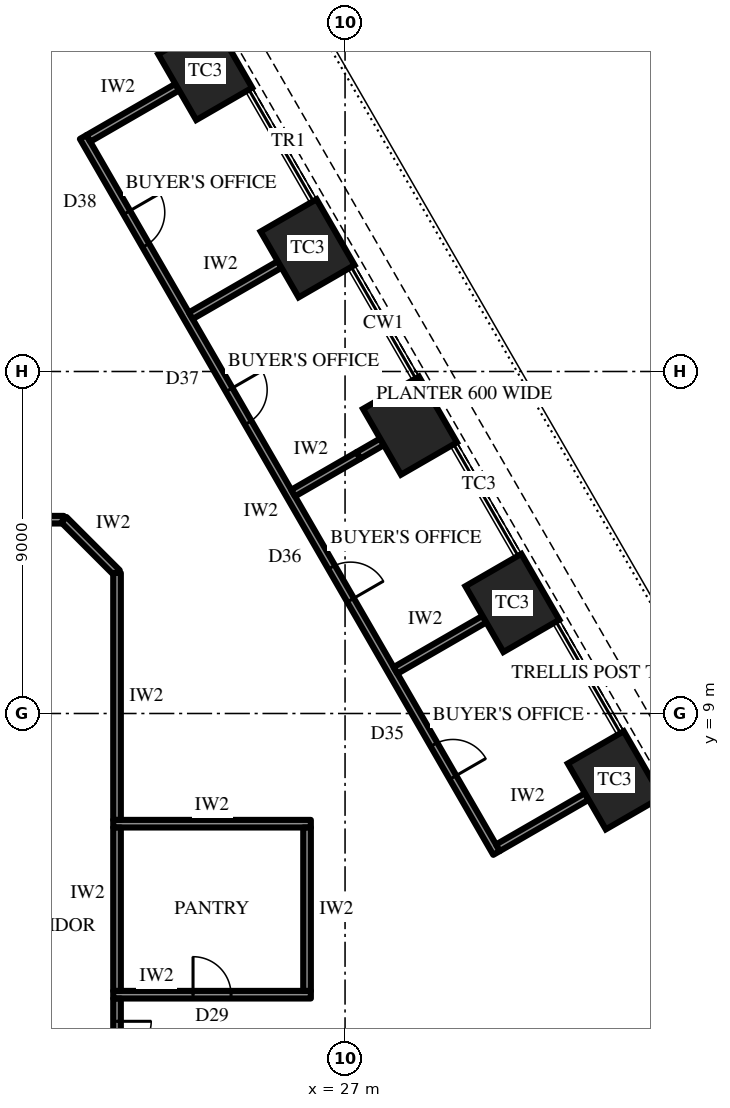
"""IFC4 building model, lengths in metres.
Left out: names, types, materials, properties, quantities, classifications, styles, units other than length and angle.
Written with IfcOpenShell. Run it as: python <this file> out.ifc"""

import sys

from ifc_helpers import new_model, si_unit, direction, frame, frame_2d, origin, origin_2d, place, context, subcontext, project, spatial, rectangle, extrude, element, fill, save


model = new_model("IFC4")
c1 = context("Model", 3, precision=1e-05, world=origin(), true_north=direction((0.0, 1.0)))
c2 = subcontext(c1, "Body", "Model", "MODEL_VIEW")
j1 = project(units=[si_unit("LENGTHUNIT", "METRE"), si_unit("PLANEANGLEUNIT", "RADIAN")], contexts=[c1])
p1 = place(None, origin())
s1 = spatial("IfcSite", under=j1, at=p1, CompositionType="ELEMENT")
p2 = place(p1, origin())
s2 = spatial("IfcBuilding", under=s1, at=p2, CompositionType="ELEMENT")
p3 = place(p2, frame((0.0, 0.0, 73.9)))
s3 = spatial("IfcBuildingStorey", under=s2, at=p3, CompositionType="ELEMENT", Elevation=73.9)
for number, where, z_axis, x_axis in (
    (1, (34.097, 7.242, 0.0), (0.0, 0.0, 1.0), (-0.5, 0.866, 0.0)),
    (2, (31.403, 11.908, 0.0), (0.0, 0.0, 1.0), (-0.5, 0.866, 0.0)),
    (3, (28.709, 16.575, 0.0), (0.0, 0.0, 1.0), (-0.5, 0.866, 0.0)),
    (4, (26.014, 21.242, 0.0), (0.0, 0.0, 1.0), (-0.5, 0.866, 0.0)),
    (5, (23.32, 25.908, 0.0), (0.0, 0.0, 1.0), (-0.5, 0.866, 0.0)),
):
    element("IfcColumn", number, at=place(p3, frame(where, z_axis=z_axis, x_axis=x_axis)), inside=s3, PredefinedType="COLUMN", context=c2, shape_type="SweptSolid", body=[
        extrude(rectangle(XDim=2.0, YDim=1.7, at=origin_2d()), origin(), (0.0, 0.0, 1.0), 4.2),
    ])
p4 = place(p3, frame((30.986, 5.33, 0.0), z_axis=(0.0, 0.0, 1.0), x_axis=(-0.500000289772, 0.866025236485, 0.0)))
e6 = element("IfcWall", 6, at=p4, inside=s3, PredefinedType="PARTITIONING", context=c2, shape_type="SweptSolid", body=[
    extrude(rectangle(XDim=21.754, YDim=0.2, at=frame_2d((10.877, 0.0))), origin(), (0.0, 0.0, 1.0), 4.0),
])
p5 = place(p4, frame((2.294, 0.0, 0.0)))
e7 = element("IfcOpeningElement", 7, at=p5, cuts=e6, PredefinedType="OPENING", context=c2, shape_type="SweptSolid", body=[
    extrude(rectangle(XDim=1.0, YDim=2.2, at=frame_2d((0.5, 1.1))), frame((0.0, 0.11, 0.0), z_axis=(0.0, -1.0, 0.0), x_axis=(1.0, 0.0, 0.0)), (0.0, 0.0, 1.0), 0.22),
])
p6 = place(p4, frame((7.683, 0.0, 0.0)))
e8 = element("IfcOpeningElement", 8, at=p6, cuts=e6, PredefinedType="OPENING", context=c2, shape_type="SweptSolid", body=[
    extrude(rectangle(XDim=1.0, YDim=2.2, at=frame_2d((0.5, 1.1))), frame((0.0, 0.11, 0.0), z_axis=(0.0, -1.0, 0.0), x_axis=(1.0, 0.0, 0.0)), (0.0, 0.0, 1.0), 0.22),
])
p7 = place(p4, frame((13.072, 0.0, 0.0)))
e9 = element("IfcOpeningElement", 9, at=p7, cuts=e6, PredefinedType="OPENING", context=c2, shape_type="SweptSolid", body=[
    extrude(rectangle(XDim=1.0, YDim=2.2, at=frame_2d((0.5, 1.1))), frame((0.0, 0.11, 0.0), z_axis=(0.0, -1.0, 0.0), x_axis=(1.0, 0.0, 0.0)), (0.0, 0.0, 1.0), 0.22),
])
p8 = place(p4, frame((18.46, 0.0, 0.0)))
e10 = element("IfcOpeningElement", 10, at=p8, cuts=e6, PredefinedType="OPENING", context=c2, shape_type="SweptSolid", body=[
    extrude(rectangle(XDim=1.0, YDim=2.2, at=frame_2d((0.5, 1.1))), frame((0.0, 0.11, 0.0), z_axis=(0.0, -1.0, 0.0), x_axis=(1.0, 0.0, 0.0)), (0.0, 0.0, 1.0), 0.22),
])
for number, where, z_axis, x_axis in (
    (11, (31.023, 5.467, 0.0), (0.0, 0.0, 1.0), (0.866, 0.5, 0.0)),
    (12, (28.329, 10.133, 0.0), (0.0, 0.0, 1.0), (0.866, 0.5, 0.0)),
):
    element("IfcWall", number, at=place(p3, frame(where, z_axis=z_axis, x_axis=x_axis)), inside=s3, PredefinedType="PARTITIONING", context=c2, shape_type="SweptSolid", body=[
        extrude(rectangle(XDim=2.7, YDim=0.2, at=frame_2d((1.35, 0.0))), origin(), (0.0, 0.0, 1.0), 2.944),
    ])
p9 = place(p3, frame((25.634, 14.8, 0.0), z_axis=(0.0, 0.0, 1.0), x_axis=(0.866038008192, 0.49997816789, 0.0)))
e13 = element("IfcWall", 13, at=p9, inside=s3, PredefinedType="PARTITIONING", context=c2, shape_type="SweptSolid", body=[
    extrude(rectangle(XDim=1.983, YDim=0.2, at=frame_2d((0.992, 0.0))), origin(), (0.0, 0.0, 1.0), 4.0),
])
p10 = place(p3, frame((27.352, 15.792, 0.0), z_axis=(0.0, 0.0, 1.0), x_axis=(0.866117509073, 0.499840435016, 0.0)))
e14 = element("IfcWall", 14, at=p10, inside=s3, PredefinedType="PARTITIONING", context=c2, shape_type="SweptSolid", body=[
    extrude(rectangle(XDim=0.717, YDim=0.2, at=frame_2d((0.358, 0.0))), origin(), (0.0, 0.0, 1.0), 2.992),
])
p11 = place(p3, frame((22.94, 19.467, 0.0), z_axis=(0.0, 0.0, 1.0), x_axis=(0.866019956843, 0.50000943426, 0.0)))
e15 = element("IfcWall", 15, at=p11, inside=s3, PredefinedType="PARTITIONING", context=c2, shape_type="SweptSolid", body=[
    extrude(rectangle(XDim=2.7, YDim=0.2, at=frame_2d((1.35, 0.0))), origin(), (0.0, 0.0, 1.0), 2.992),
])
p12 = place(p3, frame((20.246, 24.133, 0.0), z_axis=(0.0, 0.0, 1.0), x_axis=(0.86599734893, 0.500048589285, 0.0)))
e16 = element("IfcWall", 16, at=p12, inside=s3, PredefinedType="PARTITIONING", context=c2, shape_type="SweptSolid", body=[
    extrude(rectangle(XDim=2.7, YDim=0.2, at=frame_2d((1.35, 0.0))), origin(), (0.0, 0.0, 1.0), 2.992),
])
p13 = place(p3, frame((20.9, 1.6, 0.0), z_axis=(0.0, 0.0, 1.0), x_axis=(1.0, 0.0, 0.0)))
e17 = element("IfcWall", 17, at=p13, inside=s3, PredefinedType="PARTITIONING", context=c2, shape_type="SweptSolid", body=[
    extrude(rectangle(XDim=5.2, YDim=0.2, at=frame_2d((2.6, 0.0))), origin(), (0.0, 0.0, 1.0), 4.0),
])
p14 = place(p13, frame((2.1, 0.0, 0.0)))
e18 = element("IfcOpeningElement", 18, at=p14, cuts=e17, PredefinedType="OPENING", context=c2, shape_type="SweptSolid", body=[
    extrude(rectangle(XDim=1.0, YDim=2.2, at=frame_2d((0.5, 1.1))), frame((0.0, 0.11, 0.0), z_axis=(0.0, -1.0, 0.0), x_axis=(1.0, 0.0, 0.0)), (0.0, 0.0, 1.0), 0.22),
])
p15 = place(p3, frame((20.9, 6.1, 0.0), z_axis=(0.0, 0.0, 1.0), x_axis=(1.0, 0.0, 0.0)))
e19 = element("IfcWall", 19, at=p15, inside=s3, PredefinedType="PARTITIONING", context=c2, shape_type="SweptSolid", body=[
    extrude(rectangle(XDim=5.2, YDim=0.2, at=frame_2d((2.6, 0.0))), origin(), (0.0, 0.0, 1.0), 4.0),
])
for number, where, z_axis, x_axis in (
    (20, (21.0, 1.7, 0.0), (0.0, 0.0, 1.0), (0.0, 1.0, 0.0)),
    (21, (26.0, 1.7, 0.0), (0.0, 0.0, 1.0), (0.0, 1.0, 0.0)),
):
    element("IfcWall", number, at=place(p3, frame(where, z_axis=z_axis, x_axis=x_axis)), inside=s3, PredefinedType="PARTITIONING", context=c2, shape_type="SweptSolid", body=[
        extrude(rectangle(XDim=4.3, YDim=0.2, at=frame_2d((2.15, 0.0))), origin(), (0.0, 0.0, 1.0), 4.0),
    ])
p16 = place(p3, frame((-19.6, 14.1, 0.0), z_axis=(0.0, 0.0, 1.0), x_axis=(1.0, 0.0, 0.0)))
e22 = element("IfcWall", 22, at=p16, inside=s3, PredefinedType="PARTITIONING", context=c2, shape_type="SweptSolid", body=[
    extrude(rectangle(XDim=39.2, YDim=0.2, at=frame_2d((19.6, 0.0))), origin(), (0.0, 0.0, 1.0), 4.0),
])
p17 = place(p16, frame((19.1, 0.0, 0.0)))
e23 = element("IfcOpeningElement", 23, at=p17, cuts=e22, PredefinedType="OPENING", context=c2, shape_type="SweptSolid", body=[
    extrude(rectangle(XDim=1.0, YDim=2.2, at=frame_2d((0.5, 1.1))), frame((0.0, 0.11, 0.0), z_axis=(0.0, -1.0, 0.0), x_axis=(1.0, 0.0, 0.0)), (0.0, 0.0, 1.0), 0.22),
])
p18 = place(p3, frame((19.6, 14.1, 0.0), z_axis=(0.0, 0.0, 1.0), x_axis=(0.707045124756, -0.707168432242, 0.0)))
e24 = element("IfcWall", 24, at=p18, inside=s3, PredefinedType="PARTITIONING", context=c2, shape_type="SweptSolid", body=[
    extrude(rectangle(XDim=1.98, YDim=0.2, at=frame_2d((0.99, 0.0))), origin(), (0.0, 0.0, 1.0), 4.0),
])
p19 = place(p3, frame((21.0, 1.499, 0.0), z_axis=(0.0, 0.0, 1.0), x_axis=(0.0, -1.0, 0.0)))
e25 = element("IfcWall", 25, at=p19, inside=s3, PredefinedType="PARTITIONING", context=c2, shape_type="SweptSolid", body=[
    extrude(rectangle(XDim=2.998, YDim=0.2, at=frame_2d((1.499, 0.0))), origin(), (0.0, 0.0, 1.0), 4.0),
])
p20 = place(p19, frame((0.599, 0.0, 0.0)))
e26 = element("IfcOpeningElement", 26, at=p20, cuts=e25, PredefinedType="OPENING", context=c2, shape_type="SweptSolid", body=[
    extrude(rectangle(XDim=1.8, YDim=2.4, at=frame_2d((0.9, 1.2))), frame((0.0, 0.11, 0.0), z_axis=(0.0, -1.0, 0.0), x_axis=(1.0, 0.0, 0.0)), (0.0, 0.0, 1.0), 0.22),
])
p21 = place(p3, frame((21.0, 12.7, 0.0), z_axis=(0.0, 0.0, 1.0), x_axis=(0.0, -1.0, 0.0)))
e27 = element("IfcWall", 27, at=p21, inside=s3, PredefinedType="PARTITIONING", context=c2, shape_type="SweptSolid", body=[
    extrude(rectangle(XDim=6.499, YDim=0.2, at=frame_2d((3.25, 0.0))), origin(), (0.0, 0.0, 1.0), 4.0),
])
p22 = place(p5, frame((1.0, 0.0, 0.0), z_axis=(0.0, 0.0, 1.0), x_axis=(-1.0, 0.0, 0.0)))
e28 = element("IfcDoor", 28, at=p22, inside=s3, OperationType="SINGLE_SWING_LEFT", PredefinedType="DOOR", context=c2, shape_type="SweptSolid", body=[
    extrude(rectangle(XDim=1.0, YDim=2.2, at=frame_2d((0.5, 1.1))), frame((0.0, 0.025, 0.0), z_axis=(0.0, -1.0, 0.0), x_axis=(1.0, 0.0, 0.0)), (0.0, 0.0, 1.0), 0.05),
])
fill(e7, e28)
p23 = place(p6, frame((1.0, 0.0, 0.0), z_axis=(0.0, 0.0, 1.0), x_axis=(-1.0, 0.0, 0.0)))
e29 = element("IfcDoor", 29, at=p23, inside=s3, OperationType="SINGLE_SWING_LEFT", PredefinedType="DOOR", context=c2, shape_type="SweptSolid", body=[
    extrude(rectangle(XDim=1.0, YDim=2.2, at=frame_2d((0.5, 1.1))), frame((0.0, 0.025, 0.0), z_axis=(0.0, -1.0, 0.0), x_axis=(1.0, 0.0, 0.0)), (0.0, 0.0, 1.0), 0.05),
])
fill(e8, e29)
p24 = place(p7, frame((1.0, 0.0, 0.0), z_axis=(0.0, 0.0, 1.0), x_axis=(-1.0, 0.0, 0.0)))
e30 = element("IfcDoor", 30, at=p24, inside=s3, OperationType="SINGLE_SWING_RIGHT", PredefinedType="DOOR", context=c2, shape_type="SweptSolid", body=[
    extrude(rectangle(XDim=1.0, YDim=2.2, at=frame_2d((0.5, 1.1))), frame((0.0, 0.025, 0.0), z_axis=(0.0, -1.0, 0.0), x_axis=(1.0, 0.0, 0.0)), (0.0, 0.0, 1.0), 0.05),
])
fill(e9, e30)
p25 = place(p8, frame((1.0, 0.0, 0.0), z_axis=(0.0, 0.0, 1.0), x_axis=(-1.0, 0.0, 0.0)))
e31 = element("IfcDoor", 31, at=p25, inside=s3, OperationType="SINGLE_SWING_RIGHT", PredefinedType="DOOR", context=c2, shape_type="SweptSolid", body=[
    extrude(rectangle(XDim=1.0, YDim=2.2, at=frame_2d((0.5, 1.1))), frame((0.0, 0.025, 0.0), z_axis=(0.0, -1.0, 0.0), x_axis=(1.0, 0.0, 0.0)), (0.0, 0.0, 1.0), 0.05),
])
fill(e10, e31)
p26 = place(p14, origin())
e32 = element("IfcDoor", 32, at=p26, inside=s3, OperationType="SINGLE_SWING_RIGHT", PredefinedType="DOOR", context=c2, shape_type="SweptSolid", body=[
    extrude(rectangle(XDim=1.0, YDim=2.2, at=frame_2d((0.5, 1.1))), frame((0.0, 0.025, 0.0), z_axis=(0.0, -1.0, 0.0), x_axis=(1.0, 0.0, 0.0)), (0.0, 0.0, 1.0), 0.05),
])
fill(e18, e32)
p27 = place(p20, origin())
e33 = element("IfcDoor", 33, at=p27, inside=s3, OperationType="DOUBLE_DOOR_SINGLE_SWING", PredefinedType="DOOR", context=c2, shape_type="SweptSolid", body=[
    extrude(rectangle(XDim=1.8, YDim=2.4, at=frame_2d((0.9, 1.2))), frame((0.0, 0.025, 0.0), z_axis=(0.0, -1.0, 0.0), x_axis=(1.0, 0.0, 0.0)), (0.0, 0.0, 1.0), 0.05),
])
fill(e26, e33)
save(model, sys.argv[1])
